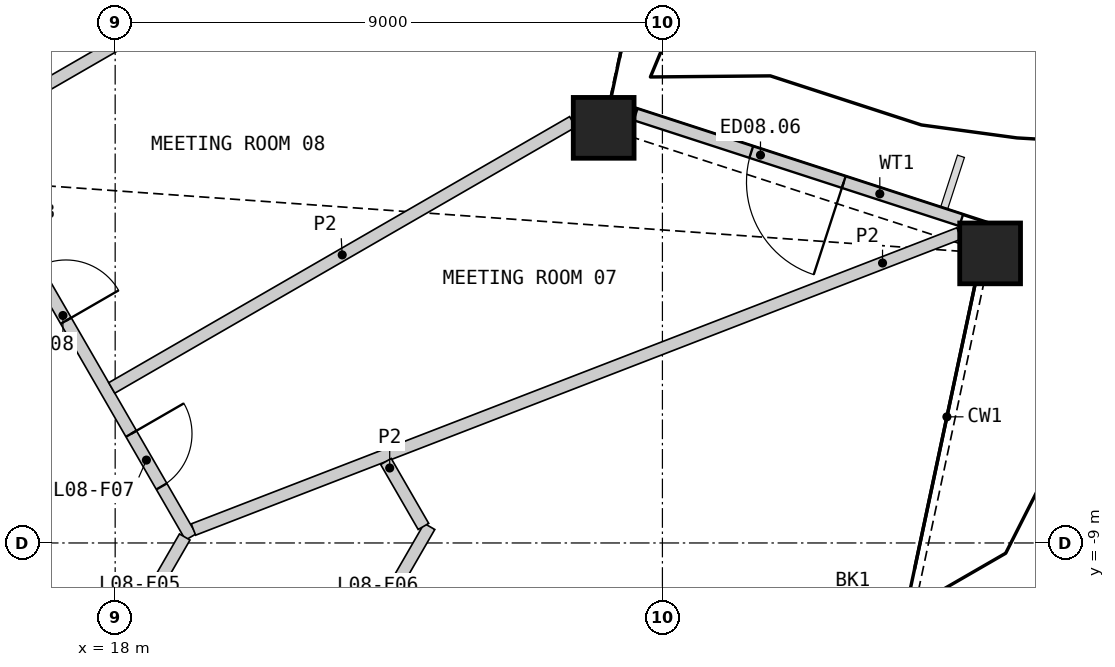
"""IFC4 building model, lengths in metres.
Left out: names, types, materials, properties, quantities, classifications, styles, units other than length and angle.
Written with IfcOpenShell. Run it as: python <this file> out.ifc"""

import sys

from ifc_helpers import new_model, si_unit, direction, frame, frame_2d, origin, origin_2d, place, context, subcontext, project, spatial, polyline, rectangle, hollow_rectangle, outline, extrude, element, fill, save


model = new_model("IFC4")
c1 = context("Model", 3, precision=1e-05, world=origin(), true_north=direction((0.0, 1.0)))
c2 = subcontext(c1, "Body", "Model", "MODEL_VIEW")
j1 = project(units=[si_unit("LENGTHUNIT", "METRE"), si_unit("PLANEANGLEUNIT", "RADIAN")], contexts=[c1])
p1 = place(None, origin())
s1 = spatial("IfcSite", under=j1, at=p1, CompositionType="ELEMENT")
p2 = place(p1, origin())
s2 = spatial("IfcBuilding", under=s1, at=p2, CompositionType="ELEMENT")
p3 = place(p2, frame((0.0, 0.0, 42.6)))
s3 = spatial("IfcBuildingStorey", under=s2, at=p3, CompositionType="ELEMENT", Elevation=42.6)
for number, where, z_axis, x_axis in (
    (1, (32.389, -4.237, 0.0), (0.0, 0.0, 1.0), (1.0, 0.0, 0.0)),
    (2, (26.034, -2.172, 0.0), (0.0, 0.0, 1.0), (1.0, 0.0, 0.0)),
):
    element("IfcColumn", number, at=place(p3, frame(where, z_axis=z_axis, x_axis=x_axis)), inside=s3, PredefinedType="COLUMN", context=c2, shape_type="SweptSolid", body=[
        extrude(hollow_rectangle(XDim=1.0, YDim=1.0, WallThickness=0.07, at=origin_2d()), origin(), (0.0, 0.0, 1.0), 4.2),
    ])
p4 = place(p3, frame((31.914, -3.693, 0.0), z_axis=(0.0, 0.0, 1.0), x_axis=(-0.951049360908, 0.309039015525, 0.0)))
e3 = element("IfcWall", 3, at=p4, inside=s3, PredefinedType="SOLIDWALL", context=c2, shape_type="SweptSolid", body=[
    extrude(rectangle(XDim=5.631, YDim=0.2, at=frame_2d((2.815, 0.0))), origin(), (0.0, 0.0, 1.0), 3.189),
])
p5 = place(p4, frame((2.031, 0.0, 0.0)))
e4 = element("IfcOpeningElement", 4, at=p5, cuts=e3, PredefinedType="OPENING", context=c2, shape_type="SweptSolid", body=[
    extrude(rectangle(XDim=1.6, YDim=2.4, at=frame_2d((0.8, 1.2))), frame((0.0, 0.11, 0.0), z_axis=(0.0, -1.0, 0.0), x_axis=(1.0, 0.0, 0.0)), (0.0, 0.0, 1.0), 0.22),
])
p6 = place(p3, origin())
e5 = element("IfcWall", 5, at=p6, inside=s3, PredefinedType="SHEAR", context=c2, shape_type="SweptSolid", body=[
    extrude(outline(polyline([(15.441, -9.815), (15.441, -8.915), (16.221, -8.465), (17.0, -9.815), (15.441, -9.815)])), origin(), (0.0, 0.0, 1.0), 3.8),
])
p7 = place(p3, frame((16.008, -3.296, 0.0), z_axis=(0.0, 0.0, 1.0), x_axis=(0.499984737558, -0.86603421538, 0.0)))
e6 = element("IfcWall", 6, at=p7, inside=s3, PredefinedType="PARTITIONING", context=c2, shape_type="SweptSolid", body=[
    extrude(rectangle(XDim=6.473, YDim=0.2, at=frame_2d((3.236, 0.0))), origin(), (0.0, 0.0, 1.0), 3.8),
])
p8 = place(p7, frame((4.512, 0.0, 0.0)))
e7 = element("IfcOpeningElement", 7, at=p8, cuts=e6, PredefinedType="OPENING", context=c2, shape_type="SweptSolid", body=[
    extrude(rectangle(XDim=1.0, YDim=2.1, at=frame_2d((0.5, 1.05))), frame((0.0, 0.11, 0.0), z_axis=(0.0, -1.0, 0.0), x_axis=(1.0, 0.0, 0.0)), (0.0, 0.0, 1.0), 0.22),
])
p9 = place(p7, frame((1.366, 0.0, 0.0)))
e8 = element("IfcOpeningElement", 8, at=p9, cuts=e6, PredefinedType="OPENING", context=c2, shape_type="SweptSolid", body=[
    extrude(rectangle(XDim=1.0, YDim=2.1, at=frame_2d((0.5, 1.05))), frame((0.0, 0.11, 0.0), z_axis=(0.0, -1.0, 0.0), x_axis=(1.0, 0.0, 0.0)), (0.0, 0.0, 1.0), 0.22),
])
p10 = place(p3, frame((17.281, -12.128, 0.0), z_axis=(0.0, 0.0, 1.0), x_axis=(0.499958791762, 0.866049194065, 0.0)))
e9 = element("IfcWall", 9, at=p10, inside=s3, PredefinedType="PARTITIONING", context=c2, shape_type="SweptSolid", body=[
    extrude(rectangle(XDim=3.726, YDim=0.2, at=frame_2d((1.863, 0.0))), origin(), (0.0, 0.0, 1.0), 3.8),
])
p11 = place(p10, frame((1.388, 0.0, 0.0)))
e10 = element("IfcOpeningElement", 10, at=p11, cuts=e9, PredefinedType="OPENING", context=c2, shape_type="SweptSolid", body=[
    extrude(rectangle(XDim=0.95, YDim=2.1, at=frame_2d((0.475, 1.05))), frame((0.0, 0.11, 0.0), z_axis=(0.0, -1.0, 0.0), x_axis=(1.0, 0.0, 0.0)), (0.0, 0.0, 1.0), 0.22),
])
p12 = place(p3, frame((19.287, -8.779, 0.0), z_axis=(0.0, 0.0, 1.0), x_axis=(0.932669586354, 0.360731815467, 0.0)))
e11 = element("IfcWall", 11, at=p12, inside=s3, PredefinedType="PARTITIONING", context=c2, shape_type="SweptSolid", body=[
    extrude(rectangle(XDim=13.501, YDim=0.2, at=frame_2d((6.75, 0.0))), origin(), (0.0, 0.0, 1.0), 2.885),
])
p13 = place(p3, frame((15.518, -2.248, 0.0), z_axis=(0.0, 0.0, 1.0), x_axis=(0.866025231175, 0.500000298968, 0.0)))
e12 = element("IfcWall", 12, at=p13, inside=s3, PredefinedType="PARTITIONING", context=c2, shape_type="SweptSolid", body=[
    extrude(rectangle(XDim=13.159, YDim=0.2, at=frame_2d((6.579, 0.0))), origin(), (0.0, 0.0, 1.0), 2.885),
])
p14 = place(p3, frame((17.944, -6.45, 0.0), z_axis=(0.0, 0.0, 1.0), x_axis=(0.866025328989, 0.50000012955, 0.0)))
e13 = element("IfcWall", 13, at=p14, inside=s3, PredefinedType="PARTITIONING", context=c2, shape_type="SweptSolid", body=[
    extrude(rectangle(XDim=8.752, YDim=0.2, at=frame_2d((4.376, 0.0))), origin(), (0.0, 0.0, 1.0), 2.885),
])
p15 = place(p3, frame((21.297, -11.973, 0.0), z_axis=(0.0, 0.0, 1.0), x_axis=(0.500008291124, 0.866020616849, 0.0)))
e14 = element("IfcWall", 14, at=p15, inside=s3, PredefinedType="PARTITIONING", context=c2, shape_type="SweptSolid", body=[
    extrude(rectangle(XDim=3.746, YDim=0.2, at=frame_2d((1.873, 0.0))), origin(), (0.0, 0.0, 1.0), 2.885),
])
p16 = place(p15, frame((1.189, 0.0, 0.0)))
e15 = element("IfcOpeningElement", 15, at=p16, cuts=e14, PredefinedType="OPENING", context=c2, shape_type="SweptSolid", body=[
    extrude(rectangle(XDim=0.95, YDim=2.1, at=frame_2d((0.475, 1.05))), frame((0.0, 0.11, 0.0), z_axis=(0.0, -1.0, 0.0), x_axis=(1.0, 0.0, 0.0)), (0.0, 0.0, 1.0), 0.22),
])
p17 = place(p3, frame((22.453, -7.66, 0.0), z_axis=(0.0, 0.0, 1.0), x_axis=(0.499928040405, -0.86606694569, 0.0)))
e16 = element("IfcWall", 16, at=p17, inside=s3, PredefinedType="PARTITIONING", context=c2, shape_type="SweptSolid", body=[
    extrude(rectangle(XDim=1.234, YDim=0.2, at=frame_2d((0.617, 0.0))), origin(), (0.0, 0.0, 1.0), 2.885),
])
p18 = place(p5, origin())
e17 = element("IfcDoor", 17, at=p18, inside=s3, OperationType="DOUBLE_DOOR_SINGLE_SWING", PredefinedType="DOOR", context=c2, shape_type="SweptSolid", body=[
    extrude(rectangle(XDim=1.6, YDim=2.4, at=frame_2d((0.8, 1.2))), frame((0.0, 0.025, 0.0), z_axis=(0.0, -1.0, 0.0), x_axis=(1.0, 0.0, 0.0)), (0.0, 0.0, 1.0), 0.05),
])
fill(e4, e17)
p19 = place(p8, origin())
e18 = element("IfcDoor", 18, at=p19, inside=s3, OperationType="SINGLE_SWING_LEFT", PredefinedType="DOOR", context=c2, shape_type="SweptSolid", body=[
    extrude(rectangle(XDim=1.0, YDim=2.1, at=frame_2d((0.5, 1.05))), frame((0.0, 0.025, 0.0), z_axis=(0.0, -1.0, 0.0), x_axis=(1.0, 0.0, 0.0)), (0.0, 0.0, 1.0), 0.05),
])
fill(e7, e18)
p20 = place(p9, origin())
e19 = element("IfcDoor", 19, at=p20, inside=s3, OperationType="SINGLE_SWING_RIGHT", PredefinedType="DOOR", context=c2, shape_type="SweptSolid", body=[
    extrude(rectangle(XDim=1.0, YDim=2.1, at=frame_2d((0.5, 1.05))), frame((0.0, 0.025, 0.0), z_axis=(0.0, -1.0, 0.0), x_axis=(1.0, 0.0, 0.0)), (0.0, 0.0, 1.0), 0.05),
])
fill(e8, e19)
save(model, sys.argv[1])
